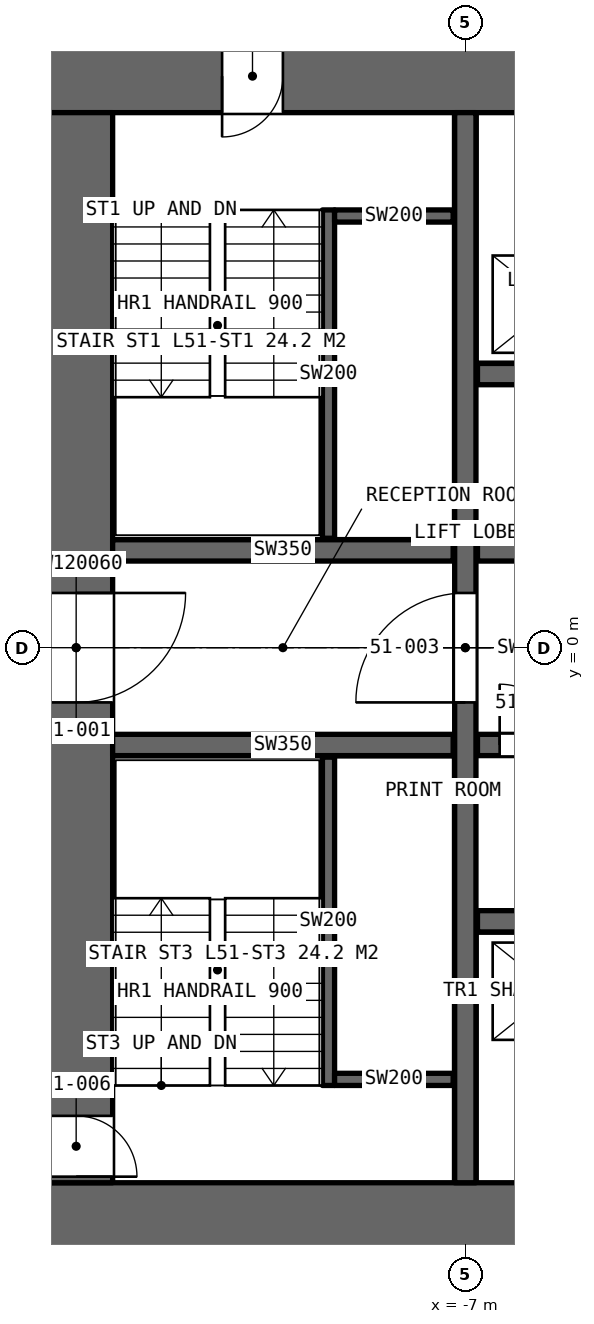
"""IFC4 building model, lengths in metres.
Left out: names, types, materials, properties, quantities, classifications, styles, units other than length and angle.
Written with IfcOpenShell. Run it as: python <this file> out.ifc"""

import sys

from ifc_helpers import new_model, si_unit, direction, frame, frame_2d, origin, place, context, subcontext, project, spatial, rectangle, extrude, element, fill, save


model = new_model("IFC4")
c1 = context("Model", 3, precision=1e-05, world=origin(), true_north=direction((0.0, 1.0)))
c2 = subcontext(c1, "Body", "Model", "MODEL_VIEW")
j1 = project(units=[si_unit("LENGTHUNIT", "METRE"), si_unit("PLANEANGLEUNIT", "RADIAN")], contexts=[c1])
p1 = place(None, origin())
s1 = spatial("IfcSite", under=j1, at=p1, CompositionType="ELEMENT")
p2 = place(p1, origin())
s2 = spatial("IfcBuilding", under=s1, at=p2, CompositionType="ELEMENT")
p3 = place(p2, frame((0.0, 0.0, 232.6)))
s3 = spatial("IfcBuildingStorey", under=s2, at=p3, CompositionType="ELEMENT", Elevation=232.6)
p4 = place(p3, frame((-14.0, -9.4, 0.0), z_axis=(0.0, 0.0, 1.0), x_axis=(1.0, 0.0, 0.0)))
e1 = element("IfcWall", 1, at=p4, inside=s3, PredefinedType="SHEAR", context=c2, shape_type="SweptSolid", body=[
    extrude(rectangle(XDim=28.0, YDim=1.2, at=frame_2d((14.0, 0.0))), origin(), (0.0, 0.0, 1.0), 4.2),
])
p5 = place(p4, frame((22.9, 0.0, 0.0)))
e2 = element("IfcOpeningElement", 2, at=p5, cuts=e1, PredefinedType="OPENING", context=c2, shape_type="SweptSolid", body=[
    extrude(rectangle(XDim=2.2, YDim=2.7, at=frame_2d((1.1, 1.35))), frame((0.0, 0.61, 0.0), z_axis=(0.0, -1.0, 0.0), x_axis=(1.0, 0.0, 0.0)), (0.0, 0.0, 1.0), 1.22),
])
p6 = place(p3, frame((14.0, 9.4, 0.0), z_axis=(0.0, 0.0, 1.0), x_axis=(-1.0, 0.0, 0.0)))
e3 = element("IfcWall", 3, at=p6, inside=s3, PredefinedType="SHEAR", context=c2, shape_type="SweptSolid", body=[
    extrude(rectangle(XDim=28.0, YDim=1.2, at=frame_2d((14.0, 0.0))), origin(), (0.0, 0.0, 1.0), 4.2),
])
p7 = place(p6, frame((24.0, 0.0, 0.0)))
e4 = element("IfcOpeningElement", 4, at=p7, cuts=e3, PredefinedType="OPENING", context=c2, shape_type="SweptSolid", body=[
    extrude(rectangle(XDim=1.0, YDim=2.4, at=frame_2d((0.5, 1.2))), frame((0.0, 0.61, 0.0), z_axis=(0.0, -1.0, 0.0), x_axis=(1.0, 0.0, 0.0)), (0.0, 0.0, 1.0), 1.22),
])
p8 = place(p3, frame((-13.4, 8.8, 0.0), z_axis=(0.0, 0.0, 1.0), x_axis=(0.0, -1.0, 0.0)))
e5 = element("IfcWall", 5, at=p8, inside=s3, PredefinedType="SHEAR", context=c2, shape_type="SweptSolid", body=[
    extrude(rectangle(XDim=17.6, YDim=1.2, at=frame_2d((8.8, 0.0))), origin(), (0.0, 0.0, 1.0), 4.2),
])
p9 = place(p8, frame((7.9, 0.0, 0.0)))
e6 = element("IfcOpeningElement", 6, at=p9, cuts=e5, PredefinedType="OPENING", context=c2, shape_type="SweptSolid", body=[
    extrude(rectangle(XDim=1.8, YDim=2.4, at=frame_2d((0.9, 1.2))), frame((0.0, 0.61, 0.0), z_axis=(0.0, -1.0, 0.0), x_axis=(1.0, 0.0, 0.0)), (0.0, 0.0, 1.0), 1.22),
])
p10 = place(p8, frame((16.5, 0.0, 0.0)))
e7 = element("IfcOpeningElement", 7, at=p10, cuts=e5, PredefinedType="OPENING", context=c2, shape_type="SweptSolid", body=[
    extrude(rectangle(XDim=1.0, YDim=2.4, at=frame_2d((0.5, 1.2))), frame((0.0, 0.61, 0.0), z_axis=(0.0, -1.0, 0.0), x_axis=(1.0, 0.0, 0.0)), (0.0, 0.0, 1.0), 1.22),
])
p11 = place(p3, frame((-7.0, -8.8, 0.0), z_axis=(0.0, 0.0, 1.0), x_axis=(0.0, 1.0, 0.0)))
e8 = element("IfcWall", 8, at=p11, inside=s3, PredefinedType="SHEAR", context=c2, shape_type="SweptSolid", body=[
    extrude(rectangle(XDim=17.6, YDim=0.35, at=frame_2d((8.8, 0.0))), origin(), (0.0, 0.0, 1.0), 4.2),
])
p12 = place(p11, frame((7.9, 0.0, 0.0)))
e9 = element("IfcOpeningElement", 9, at=p12, cuts=e8, PredefinedType="OPENING", context=c2, shape_type="SweptSolid", body=[
    extrude(rectangle(XDim=1.8, YDim=2.4, at=frame_2d((0.9, 1.2))), frame((0.0, 0.185, 0.0), z_axis=(0.0, -1.0, 0.0), x_axis=(1.0, 0.0, 0.0)), (0.0, 0.0, 1.0), 0.37),
])
p13 = place(p3, frame((-6.8, 1.6, 0.0), z_axis=(0.0, 0.0, 1.0), x_axis=(1.0, 0.0, 0.0)))
e10 = element("IfcWall", 10, at=p13, inside=s3, PredefinedType="SHEAR", context=c2, shape_type="SweptSolid", body=[
    extrude(rectangle(XDim=13.6, YDim=0.35, at=frame_2d((6.8, 0.0))), origin(), (0.0, 0.0, 1.0), 4.2),
])
p14 = place(p13, frame((11.9, 0.0, 0.0)))
e11 = element("IfcOpeningElement", 11, at=p14, cuts=e10, PredefinedType="OPENING", context=c2, shape_type="SweptSolid", body=[
    extrude(rectangle(XDim=1.0, YDim=2.4, at=frame_2d((0.5, 1.2))), frame((0.0, 0.185, 0.0), z_axis=(0.0, -1.0, 0.0), x_axis=(1.0, 0.0, 0.0)), (0.0, 0.0, 1.0), 0.37),
])
p15 = place(p13, frame((4.5, 0.0, 0.0)))
e12 = element("IfcOpeningElement", 12, at=p15, cuts=e10, PredefinedType="OPENING", context=c2, shape_type="SweptSolid", body=[
    extrude(rectangle(XDim=1.8, YDim=2.4, at=frame_2d((0.9, 1.2))), frame((0.0, 0.185, 0.0), z_axis=(0.0, -1.0, 0.0), x_axis=(1.0, 0.0, 0.0)), (0.0, 0.0, 1.0), 0.37),
])
p16 = place(p3, frame((-6.8, -1.6, 0.0), z_axis=(0.0, 0.0, 1.0), x_axis=(1.0, 0.0, 0.0)))
e13 = element("IfcWall", 13, at=p16, inside=s3, PredefinedType="SHEAR", context=c2, shape_type="SweptSolid", body=[
    extrude(rectangle(XDim=13.6, YDim=0.35, at=frame_2d((6.8, 0.0))), origin(), (0.0, 0.0, 1.0), 4.2),
])
p17 = place(p16, frame((0.365, 0.0, 0.0)))
e14 = element("IfcOpeningElement", 14, at=p17, cuts=e13, PredefinedType="OPENING", context=c2, shape_type="SweptSolid", body=[
    extrude(rectangle(XDim=1.0, YDim=2.4, at=frame_2d((0.5, 1.2))), frame((0.0, 0.185, 0.0), z_axis=(0.0, -1.0, 0.0), x_axis=(1.0, 0.0, 0.0)), (0.0, 0.0, 1.0), 0.37),
])
p18 = place(p16, frame((3.1, 0.0, 0.0)))
e15 = element("IfcOpeningElement", 15, at=p18, cuts=e13, PredefinedType="OPENING", context=c2, shape_type="SweptSolid", body=[
    extrude(rectangle(XDim=1.0, YDim=2.4, at=frame_2d((0.5, 1.2))), frame((0.0, 0.185, 0.0), z_axis=(0.0, -1.0, 0.0), x_axis=(1.0, 0.0, 0.0)), (0.0, 0.0, 1.0), 0.37),
])
p19 = place(p16, frame((6.7, 0.0, 0.0)))
e16 = element("IfcOpeningElement", 16, at=p19, cuts=e13, PredefinedType="OPENING", context=c2, shape_type="SweptSolid", body=[
    extrude(rectangle(XDim=1.0, YDim=2.4, at=frame_2d((0.5, 1.2))), frame((0.0, 0.185, 0.0), z_axis=(0.0, -1.0, 0.0), x_axis=(1.0, 0.0, 0.0)), (0.0, 0.0, 1.0), 0.37),
])
p20 = place(p16, frame((9.485, 0.0, 0.0)))
e17 = element("IfcOpeningElement", 17, at=p20, cuts=e13, PredefinedType="OPENING", context=c2, shape_type="SweptSolid", body=[
    extrude(rectangle(XDim=0.9, YDim=2.4, at=frame_2d((0.45, 1.2))), frame((0.0, 0.185, 0.0), z_axis=(0.0, -1.0, 0.0), x_axis=(1.0, 0.0, 0.0)), (0.0, 0.0, 1.0), 0.37),
])
p21 = place(p16, frame((11.85, 0.0, 0.0)))
e18 = element("IfcOpeningElement", 18, at=p21, cuts=e13, PredefinedType="OPENING", context=c2, shape_type="SweptSolid", body=[
    extrude(rectangle(XDim=1.1, YDim=2.4, at=frame_2d((0.55, 1.2))), frame((0.0, 0.185, 0.0), z_axis=(0.0, -1.0, 0.0), x_axis=(1.0, 0.0, 0.0)), (0.0, 0.0, 1.0), 0.37),
])
p22 = place(p3, frame((-6.8, 4.5, 0.0), z_axis=(0.0, 0.0, 1.0), x_axis=(1.0, 0.0, 0.0)))
e19 = element("IfcWall", 19, at=p22, inside=s3, PredefinedType="SHEAR", context=c2, shape_type="SweptSolid", body=[
    extrude(rectangle(XDim=13.6, YDim=0.35, at=frame_2d((6.8, 0.0))), origin(), (0.0, 0.0, 1.0), 4.2),
])
p23 = place(p22, frame((0.7, 0.0, 0.0)))
e20 = element("IfcOpeningElement", 20, at=p23, cuts=e19, PredefinedType="OPENING", context=c2, shape_type="SweptSolid", body=[
    extrude(rectangle(XDim=1.1, YDim=2.4, at=frame_2d((0.55, 1.2))), frame((0.0, 0.185, 0.0), z_axis=(0.0, -1.0, 0.0), x_axis=(1.0, 0.0, 0.0)), (0.0, 0.0, 1.0), 0.37),
])
p24 = place(p22, frame((3.5, 0.0, 0.0)))
e21 = element("IfcOpeningElement", 21, at=p24, cuts=e19, PredefinedType="OPENING", context=c2, shape_type="SweptSolid", body=[
    extrude(rectangle(XDim=1.1, YDim=2.4, at=frame_2d((0.55, 1.2))), frame((0.0, 0.185, 0.0), z_axis=(0.0, -1.0, 0.0), x_axis=(1.0, 0.0, 0.0)), (0.0, 0.0, 1.0), 0.37),
])
p25 = place(p22, frame((6.3, 0.0, 0.0)))
e22 = element("IfcOpeningElement", 22, at=p25, cuts=e19, PredefinedType="OPENING", context=c2, shape_type="SweptSolid", body=[
    extrude(rectangle(XDim=1.1, YDim=2.4, at=frame_2d((0.55, 1.2))), frame((0.0, 0.185, 0.0), z_axis=(0.0, -1.0, 0.0), x_axis=(1.0, 0.0, 0.0)), (0.0, 0.0, 1.0), 0.37),
])
p26 = place(p22, frame((9.1, 0.0, 0.0)))
e23 = element("IfcOpeningElement", 23, at=p26, cuts=e19, PredefinedType="OPENING", context=c2, shape_type="SweptSolid", body=[
    extrude(rectangle(XDim=1.1, YDim=2.4, at=frame_2d((0.55, 1.2))), frame((0.0, 0.185, 0.0), z_axis=(0.0, -1.0, 0.0), x_axis=(1.0, 0.0, 0.0)), (0.0, 0.0, 1.0), 0.37),
])
p27 = place(p3, frame((-6.8, -4.5, 0.0), z_axis=(0.0, 0.0, 1.0), x_axis=(1.0, 0.0, 0.0)))
e24 = element("IfcWall", 24, at=p27, inside=s3, PredefinedType="SHEAR", context=c2, shape_type="SweptSolid", body=[
    extrude(rectangle(XDim=13.6, YDim=0.35, at=frame_2d((6.8, 0.0))), origin(), (0.0, 0.0, 1.0), 4.2),
])
for number, where, z_axis, x_axis in (
    (25, (-12.8, 1.6, 0.0), (0.0, 0.0, 1.0), (1.0, 0.0, 0.0)),
    (26, (-12.8, -1.6, 0.0), (0.0, 0.0, 1.0), (1.0, 0.0, 0.0)),
):
    element("IfcWall", number, at=place(p3, frame(where, z_axis=z_axis, x_axis=x_axis)), inside=s3, PredefinedType="SHEAR", context=c2, shape_type="SweptSolid", body=[
        extrude(rectangle(XDim=5.6, YDim=0.35, at=frame_2d((2.8, 0.0))), origin(), (0.0, 0.0, 1.0), 4.2),
    ])
p28 = place(p3, frame((-9.25, 7.2, 0.0), z_axis=(0.0, 0.0, 1.0), x_axis=(0.0, -1.0, 0.0)))
e27 = element("IfcWall", 27, at=p28, inside=s3, PredefinedType="SOLIDWALL", context=c2, shape_type="SweptSolid", body=[
    extrude(rectangle(XDim=5.4, YDim=0.2, at=frame_2d((2.7, 0.0))), origin(), (0.0, 0.0, 1.0), 4.2),
])
p29 = place(p3, frame((-9.15, 7.1, 0.0), z_axis=(0.0, 0.0, 1.0), x_axis=(1.0, 0.0, 0.0)))
e28 = element("IfcWall", 28, at=p29, inside=s3, PredefinedType="SOLIDWALL", context=c2, shape_type="SweptSolid", body=[
    extrude(rectangle(XDim=1.95, YDim=0.2, at=frame_2d((0.975, 0.0))), origin(), (0.0, 0.0, 1.0), 4.2),
])
p30 = place(p3, frame((-9.25, -7.2, 0.0), z_axis=(0.0, 0.0, 1.0), x_axis=(0.0, 1.0, 0.0)))
e29 = element("IfcWall", 29, at=p30, inside=s3, PredefinedType="SOLIDWALL", context=c2, shape_type="SweptSolid", body=[
    extrude(rectangle(XDim=5.4, YDim=0.2, at=frame_2d((2.7, 0.0))), origin(), (0.0, 0.0, 1.0), 4.2),
])
p31 = place(p3, frame((-9.15, -7.1, 0.0), z_axis=(0.0, 0.0, 1.0), x_axis=(1.0, 0.0, 0.0)))
e30 = element("IfcWall", 30, at=p31, inside=s3, PredefinedType="SOLIDWALL", context=c2, shape_type="SweptSolid", body=[
    extrude(rectangle(XDim=1.95, YDim=0.2, at=frame_2d((0.975, 0.0))), origin(), (0.0, 0.0, 1.0), 4.2),
])
p32 = place(p9, origin())
e31 = element("IfcDoor", 31, at=p32, inside=s3, OperationType="DOUBLE_DOOR_SINGLE_SWING", PredefinedType="DOOR", context=c2, shape_type="SweptSolid", body=[
    extrude(rectangle(XDim=1.8, YDim=2.4, at=frame_2d((0.9, 1.2))), frame((0.0, 0.025, 0.0), z_axis=(0.0, -1.0, 0.0), x_axis=(1.0, 0.0, 0.0)), (0.0, 0.0, 1.0), 0.05),
])
fill(e6, e31)
p33 = place(p12, origin())
e32 = element("IfcDoor", 32, at=p33, inside=s3, OperationType="DOUBLE_DOOR_SINGLE_SWING", PredefinedType="DOOR", context=c2, shape_type="SweptSolid", body=[
    extrude(rectangle(XDim=1.8, YDim=2.4, at=frame_2d((0.9, 1.2))), frame((0.0, 0.025, 0.0), z_axis=(0.0, -1.0, 0.0), x_axis=(1.0, 0.0, 0.0)), (0.0, 0.0, 1.0), 0.05),
])
fill(e9, e32)
p34 = place(p7, origin())
e33 = element("IfcDoor", 33, at=p34, inside=s3, OperationType="SINGLE_SWING_RIGHT", PredefinedType="DOOR", context=c2, shape_type="SweptSolid", body=[
    extrude(rectangle(XDim=1.0, YDim=2.4, at=frame_2d((0.5, 1.2))), frame((0.0, 0.025, 0.0), z_axis=(0.0, -1.0, 0.0), x_axis=(1.0, 0.0, 0.0)), (0.0, 0.0, 1.0), 0.05),
])
fill(e4, e33)
p35 = place(p10, origin())
e34 = element("IfcDoor", 34, at=p35, inside=s3, OperationType="SINGLE_SWING_RIGHT", PredefinedType="DOOR", context=c2, shape_type="SweptSolid", body=[
    extrude(rectangle(XDim=1.0, YDim=2.4, at=frame_2d((0.5, 1.2))), frame((0.0, 0.025, 0.0), z_axis=(0.0, -1.0, 0.0), x_axis=(1.0, 0.0, 0.0)), (0.0, 0.0, 1.0), 0.05),
])
fill(e7, e34)
p36 = place(p17, origin())
e35 = element("IfcDoor", 35, at=p36, inside=s3, OperationType="SINGLE_SWING_LEFT", PredefinedType="DOOR", context=c2, shape_type="SweptSolid", body=[
    extrude(rectangle(XDim=1.0, YDim=2.4, at=frame_2d((0.5, 1.2))), frame((0.0, 0.025, 0.0), z_axis=(0.0, -1.0, 0.0), x_axis=(1.0, 0.0, 0.0)), (0.0, 0.0, 1.0), 0.05),
])
fill(e14, e35)
save(model, sys.argv[1])
